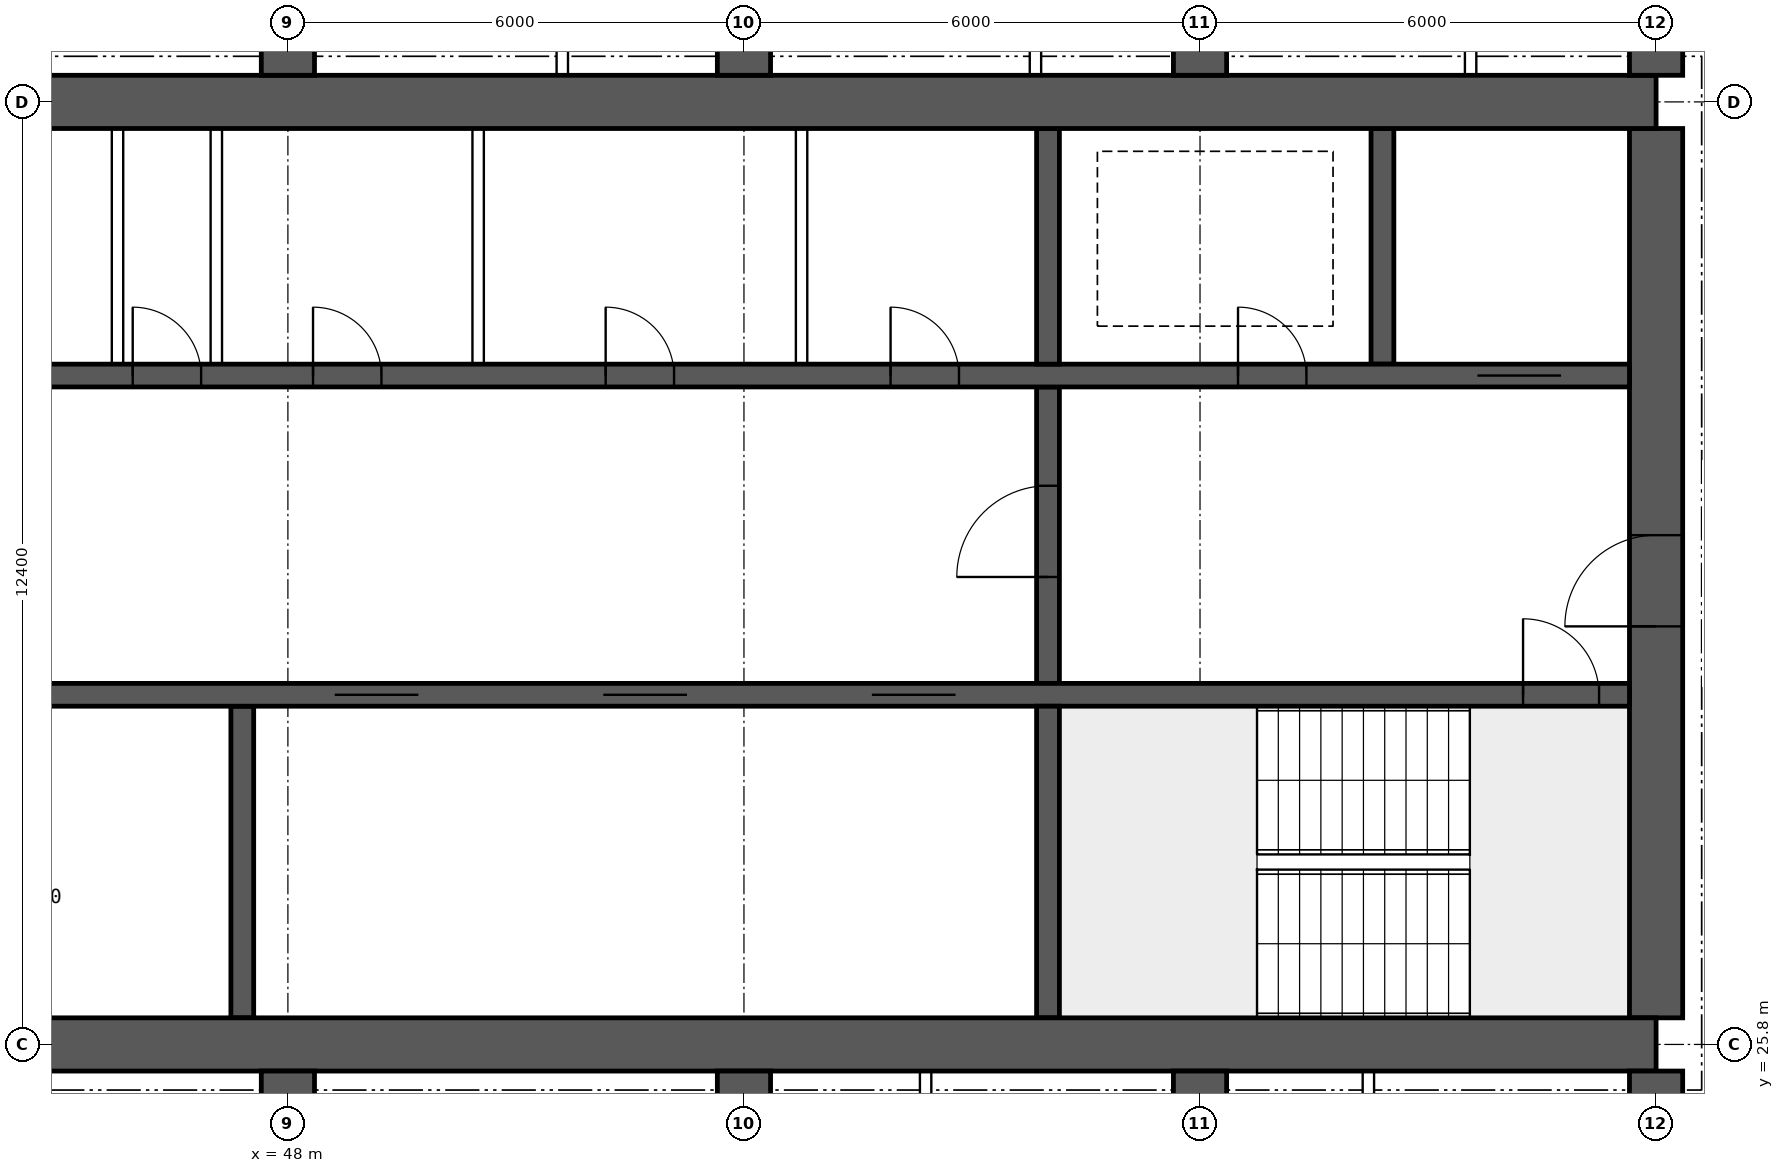
"""IFC4 building model, lengths in metres.
Left out: names, types, materials, properties, quantities, classifications, styles, units other than length and angle.
Written with IfcOpenShell. Run it as: python <this file> out.ifc"""

import sys

from ifc_helpers import new_model, si_unit, direction, frame, frame_2d, origin, place, context, subcontext, project, spatial, rectangle, extrude, element, fill, save


model = new_model("IFC4")
c1 = context("Model", 3, precision=1e-05, world=origin(), true_north=direction((0.0, 1.0)))
c2 = subcontext(c1, "Body", "Model", "MODEL_VIEW")
j1 = project(units=[si_unit("LENGTHUNIT", "METRE"), si_unit("PLANEANGLEUNIT", "RADIAN")], contexts=[c1])
p1 = place(None, origin())
s1 = spatial("IfcSite", under=j1, at=p1, CompositionType="ELEMENT")
p2 = place(p1, origin())
s2 = spatial("IfcBuilding", under=s1, at=p2, CompositionType="ELEMENT")
p3 = place(p2, frame((0.0, 0.0, 212.8)))
s3 = spatial("IfcBuildingStorey", under=s2, at=p3, CompositionType="ELEMENT", Elevation=212.8)
for number, where, z_axis, x_axis in (
    (1, (18.0, 25.8, 0.0), (0.0, 0.0, 1.0), (1.0, 0.0, 0.0)),
    (2, (18.0, 38.2, 0.0), (0.0, 0.0, 1.0), (1.0, 0.0, 0.0)),
):
    element("IfcWall", number, at=place(p3, frame(where, z_axis=z_axis, x_axis=x_axis)), inside=s3, PredefinedType="SHEAR", context=c2, shape_type="SweptSolid", body=[
        extrude(rectangle(XDim=48.0, YDim=0.7, at=frame_2d((24.0, 0.0))), origin(), (0.0, 0.0, 1.0), 3.75),
    ])
p4 = place(p3, frame((66.0, 26.15, 0.0), z_axis=(0.0, 0.0, 1.0), x_axis=(0.0, 1.0, 0.0)))
e3 = element("IfcWall", 3, at=p4, inside=s3, PredefinedType="SHEAR", context=c2, shape_type="SweptSolid", body=[
    extrude(rectangle(XDim=11.7, YDim=0.7, at=frame_2d((5.85, 0.0))), origin(), (0.0, 0.0, 1.0), 3.75),
])
p5 = place(p4, frame((5.15, 0.0, 0.0)))
e4 = element("IfcOpeningElement", 4, at=p5, cuts=e3, PredefinedType="OPENING", context=c2, shape_type="SweptSolid", body=[
    extrude(rectangle(XDim=1.2, YDim=2.1, at=frame_2d((0.6, 1.05))), frame((0.0, 0.36, 0.0), z_axis=(0.0, -1.0, 0.0), x_axis=(1.0, 0.0, 0.0)), (0.0, 0.0, 1.0), 0.72),
])
p6 = place(p3, frame((18.35, 30.4, 0.0), z_axis=(0.0, 0.0, 1.0), x_axis=(1.0, 0.0, 0.0)))
e5 = element("IfcWall", 5, at=p6, inside=s3, PredefinedType="SHEAR", context=c2, shape_type="SweptSolid", body=[
    extrude(rectangle(XDim=47.3, YDim=0.3, at=frame_2d((23.65, 0.0))), origin(), (0.0, 0.0, 1.0), 3.75),
])
p7 = place(p6, frame((0.4, 0.0, 0.0)))
e6 = element("IfcOpeningElement", 6, at=p7, cuts=e5, PredefinedType="OPENING", context=c2, shape_type="SweptSolid", body=[
    extrude(rectangle(XDim=1.0, YDim=2.1, at=frame_2d((0.5, 1.05))), frame((0.0, 0.16, 0.0), z_axis=(0.0, -1.0, 0.0), x_axis=(1.0, 0.0, 0.0)), (0.0, 0.0, 1.0), 0.32),
])
p8 = place(p6, frame((45.9, 0.0, 0.0)))
e7 = element("IfcOpeningElement", 7, at=p8, cuts=e5, PredefinedType="OPENING", context=c2, shape_type="SweptSolid", body=[
    extrude(rectangle(XDim=1.0, YDim=2.1, at=frame_2d((0.5, 1.05))), frame((0.0, 0.16, 0.0), z_axis=(0.0, -1.0, 0.0), x_axis=(1.0, 0.0, 0.0)), (0.0, 0.0, 1.0), 0.32),
])
p9 = place(p6, frame((8.4, 0.0, 0.0)))
e8 = element("IfcOpeningElement", 8, at=p9, cuts=e5, PredefinedType="OPENING", context=c2, shape_type="SweptSolid", body=[
    extrude(rectangle(XDim=1.1, YDim=2.1, at=frame_2d((0.55, 1.05))), frame((0.0, 0.16, 0.0), z_axis=(0.0, -1.0, 0.0), x_axis=(1.0, 0.0, 0.0)), (0.0, 0.0, 1.0), 0.32),
])
p10 = place(p6, frame((11.0, 0.0, 0.0)))
e9 = element("IfcOpeningElement", 9, at=p10, cuts=e5, PredefinedType="OPENING", context=c2, shape_type="SweptSolid", body=[
    extrude(rectangle(XDim=1.1, YDim=2.1, at=frame_2d((0.55, 1.05))), frame((0.0, 0.16, 0.0), z_axis=(0.0, -1.0, 0.0), x_axis=(1.0, 0.0, 0.0)), (0.0, 0.0, 1.0), 0.32),
])
p11 = place(p6, frame((13.6, 0.0, 0.0)))
e10 = element("IfcOpeningElement", 10, at=p11, cuts=e5, PredefinedType="OPENING", context=c2, shape_type="SweptSolid", body=[
    extrude(rectangle(XDim=1.1, YDim=2.1, at=frame_2d((0.55, 1.05))), frame((0.0, 0.16, 0.0), z_axis=(0.0, -1.0, 0.0), x_axis=(1.0, 0.0, 0.0)), (0.0, 0.0, 1.0), 0.32),
])
p12 = place(p6, frame((16.2, 0.0, 0.0)))
e11 = element("IfcOpeningElement", 11, at=p12, cuts=e5, PredefinedType="OPENING", context=c2, shape_type="SweptSolid", body=[
    extrude(rectangle(XDim=1.1, YDim=2.1, at=frame_2d((0.55, 1.05))), frame((0.0, 0.16, 0.0), z_axis=(0.0, -1.0, 0.0), x_axis=(1.0, 0.0, 0.0)), (0.0, 0.0, 1.0), 0.32),
])
p13 = place(p6, frame((18.975, 0.0, 0.0)))
e12 = element("IfcOpeningElement", 12, at=p13, cuts=e5, PredefinedType="OPENING", context=c2, shape_type="SweptSolid", body=[
    extrude(rectangle(XDim=0.9, YDim=2.1, at=frame_2d((0.45, 1.05))), frame((0.0, 0.16, 0.0), z_axis=(0.0, -1.0, 0.0), x_axis=(1.0, 0.0, 0.0)), (0.0, 0.0, 1.0), 0.32),
])
p14 = place(p6, frame((30.267, 0.0, 0.0)))
e13 = element("IfcOpeningElement", 13, at=p14, cuts=e5, PredefinedType="OPENING", context=c2, shape_type="SweptSolid", body=[
    extrude(rectangle(XDim=1.1, YDim=2.1, at=frame_2d((0.55, 1.05))), frame((0.0, 0.16, 0.0), z_axis=(0.0, -1.0, 0.0), x_axis=(1.0, 0.0, 0.0)), (0.0, 0.0, 1.0), 0.32),
])
p15 = place(p6, frame((33.8, 0.0, 0.0)))
e14 = element("IfcOpeningElement", 14, at=p15, cuts=e5, PredefinedType="OPENING", context=c2, shape_type="SweptSolid", body=[
    extrude(rectangle(XDim=1.1, YDim=2.1, at=frame_2d((0.55, 1.05))), frame((0.0, 0.16, 0.0), z_axis=(0.0, -1.0, 0.0), x_axis=(1.0, 0.0, 0.0)), (0.0, 0.0, 1.0), 0.32),
])
p16 = place(p6, frame((37.333, 0.0, 0.0)))
e15 = element("IfcOpeningElement", 15, at=p16, cuts=e5, PredefinedType="OPENING", context=c2, shape_type="SweptSolid", body=[
    extrude(rectangle(XDim=1.1, YDim=2.1, at=frame_2d((0.55, 1.05))), frame((0.0, 0.16, 0.0), z_axis=(0.0, -1.0, 0.0), x_axis=(1.0, 0.0, 0.0)), (0.0, 0.0, 1.0), 0.32),
])
p17 = place(p3, frame((18.35, 34.6, 0.0), z_axis=(0.0, 0.0, 1.0), x_axis=(1.0, 0.0, 0.0)))
e16 = element("IfcWall", 16, at=p17, inside=s3, PredefinedType="SHEAR", context=c2, shape_type="SweptSolid", body=[
    extrude(rectangle(XDim=47.3, YDim=0.3, at=frame_2d((23.65, 0.0))), origin(), (0.0, 0.0, 1.0), 3.75),
])
p18 = place(p17, frame((0.9, 0.0, 0.0)))
e17 = element("IfcOpeningElement", 17, at=p18, cuts=e16, PredefinedType="OPENING", context=c2, shape_type="SweptSolid", body=[
    extrude(rectangle(XDim=1.1, YDim=2.1, at=frame_2d((0.55, 1.05))), frame((0.0, 0.16, 0.0), z_axis=(0.0, -1.0, 0.0), x_axis=(1.0, 0.0, 0.0)), (0.0, 0.0, 1.0), 0.32),
])
p19 = place(p17, frame((45.3, 0.0, 0.0)))
e18 = element("IfcOpeningElement", 18, at=p19, cuts=e16, PredefinedType="OPENING", context=c2, shape_type="SweptSolid", body=[
    extrude(rectangle(XDim=1.1, YDim=2.1, at=frame_2d((0.55, 1.05))), frame((0.0, 0.16, 0.0), z_axis=(0.0, -1.0, 0.0), x_axis=(1.0, 0.0, 0.0)), (0.0, 0.0, 1.0), 0.32),
])
p20 = place(p17, frame((4.25, 0.0, 0.0)))
e19 = element("IfcOpeningElement", 19, at=p20, cuts=e16, PredefinedType="OPENING", context=c2, shape_type="SweptSolid", body=[
    extrude(rectangle(XDim=0.9, YDim=2.1, at=frame_2d((0.45, 1.05))), frame((0.0, 0.16, 0.0), z_axis=(0.0, -1.0, 0.0), x_axis=(1.0, 0.0, 0.0)), (0.0, 0.0, 1.0), 0.32),
])
p21 = place(p17, frame((42.15, 0.0, 0.0)))
e20 = element("IfcOpeningElement", 20, at=p21, cuts=e16, PredefinedType="OPENING", context=c2, shape_type="SweptSolid", body=[
    extrude(rectangle(XDim=0.9, YDim=2.1, at=frame_2d((0.45, 1.05))), frame((0.0, 0.16, 0.0), z_axis=(0.0, -1.0, 0.0), x_axis=(1.0, 0.0, 0.0)), (0.0, 0.0, 1.0), 0.32),
])
p22 = place(p17, frame((9.025, 0.0, 0.0)))
e21 = element("IfcOpeningElement", 21, at=p22, cuts=e16, PredefinedType="OPENING", context=c2, shape_type="SweptSolid", body=[
    extrude(rectangle(XDim=0.9, YDim=2.1, at=frame_2d((0.45, 1.05))), frame((0.0, 0.16, 0.0), z_axis=(0.0, -1.0, 0.0), x_axis=(1.0, 0.0, 0.0)), (0.0, 0.0, 1.0), 0.32),
])
p23 = place(p17, frame((12.999, 0.0, 0.0)))
e22 = element("IfcOpeningElement", 22, at=p23, cuts=e16, PredefinedType="OPENING", context=c2, shape_type="SweptSolid", body=[
    extrude(rectangle(XDim=0.9, YDim=2.1, at=frame_2d((0.45, 1.05))), frame((0.0, 0.16, 0.0), z_axis=(0.0, -1.0, 0.0), x_axis=(1.0, 0.0, 0.0)), (0.0, 0.0, 1.0), 0.32),
])
p24 = place(p17, frame((16.646, 0.0, 0.0)))
e23 = element("IfcOpeningElement", 23, at=p24, cuts=e16, PredefinedType="OPENING", context=c2, shape_type="SweptSolid", body=[
    extrude(rectangle(XDim=0.9, YDim=2.1, at=frame_2d((0.45, 1.05))), frame((0.0, 0.16, 0.0), z_axis=(0.0, -1.0, 0.0), x_axis=(1.0, 0.0, 0.0)), (0.0, 0.0, 1.0), 0.32),
])
p25 = place(p17, frame((20.405, 0.0, 0.0)))
e24 = element("IfcOpeningElement", 24, at=p25, cuts=e16, PredefinedType="OPENING", context=c2, shape_type="SweptSolid", body=[
    extrude(rectangle(XDim=0.9, YDim=2.1, at=frame_2d((0.45, 1.05))), frame((0.0, 0.16, 0.0), z_axis=(0.0, -1.0, 0.0), x_axis=(1.0, 0.0, 0.0)), (0.0, 0.0, 1.0), 0.32),
])
p26 = place(p17, frame((24.811, 0.0, 0.0)))
e25 = element("IfcOpeningElement", 25, at=p26, cuts=e16, PredefinedType="OPENING", context=c2, shape_type="SweptSolid", body=[
    extrude(rectangle(XDim=0.9, YDim=2.1, at=frame_2d((0.45, 1.05))), frame((0.0, 0.16, 0.0), z_axis=(0.0, -1.0, 0.0), x_axis=(1.0, 0.0, 0.0)), (0.0, 0.0, 1.0), 0.32),
])
p27 = place(p17, frame((27.608, 0.0, 0.0)))
e26 = element("IfcOpeningElement", 26, at=p27, cuts=e16, PredefinedType="OPENING", context=c2, shape_type="SweptSolid", body=[
    extrude(rectangle(XDim=0.9, YDim=2.1, at=frame_2d((0.45, 1.05))), frame((0.0, 0.16, 0.0), z_axis=(0.0, -1.0, 0.0), x_axis=(1.0, 0.0, 0.0)), (0.0, 0.0, 1.0), 0.32),
])
p28 = place(p17, frame((29.981, 0.0, 0.0)))
e27 = element("IfcOpeningElement", 27, at=p28, cuts=e16, PredefinedType="OPENING", context=c2, shape_type="SweptSolid", body=[
    extrude(rectangle(XDim=0.9, YDim=2.1, at=frame_2d((0.45, 1.05))), frame((0.0, 0.16, 0.0), z_axis=(0.0, -1.0, 0.0), x_axis=(1.0, 0.0, 0.0)), (0.0, 0.0, 1.0), 0.32),
])
p29 = place(p17, frame((33.831, 0.0, 0.0)))
e28 = element("IfcOpeningElement", 28, at=p29, cuts=e16, PredefinedType="OPENING", context=c2, shape_type="SweptSolid", body=[
    extrude(rectangle(XDim=0.9, YDim=2.1, at=frame_2d((0.45, 1.05))), frame((0.0, 0.16, 0.0), z_axis=(0.0, -1.0, 0.0), x_axis=(1.0, 0.0, 0.0)), (0.0, 0.0, 1.0), 0.32),
])
p30 = place(p17, frame((37.579, 0.0, 0.0)))
e29 = element("IfcOpeningElement", 29, at=p30, cuts=e16, PredefinedType="OPENING", context=c2, shape_type="SweptSolid", body=[
    extrude(rectangle(XDim=0.9, YDim=2.1, at=frame_2d((0.45, 1.05))), frame((0.0, 0.16, 0.0), z_axis=(0.0, -1.0, 0.0), x_axis=(1.0, 0.0, 0.0)), (0.0, 0.0, 1.0), 0.32),
])
p31 = place(p3, frame((58.0, 26.15, 0.0), z_axis=(0.0, 0.0, 1.0), x_axis=(0.0, 1.0, 0.0)))
e30 = element("IfcWall", 30, at=p31, inside=s3, PredefinedType="SHEAR", context=c2, shape_type="SweptSolid", body=[
    extrude(rectangle(XDim=4.1, YDim=0.3, at=frame_2d((2.05, 0.0))), origin(), (0.0, 0.0, 1.0), 3.75),
])
p32 = place(p3, frame((58.0, 30.55, 0.0), z_axis=(0.0, 0.0, 1.0), x_axis=(0.0, 1.0, 0.0)))
e31 = element("IfcWall", 31, at=p32, inside=s3, PredefinedType="SHEAR", context=c2, shape_type="SweptSolid", body=[
    extrude(rectangle(XDim=3.9, YDim=0.3, at=frame_2d((1.95, 0.0))), origin(), (0.0, 0.0, 1.0), 3.75),
])
p33 = place(p32, frame((1.4, 0.0, 0.0)))
e32 = element("IfcOpeningElement", 32, at=p33, cuts=e31, PredefinedType="OPENING", context=c2, shape_type="SweptSolid", body=[
    extrude(rectangle(XDim=1.2, YDim=2.1, at=frame_2d((0.6, 1.05))), frame((0.0, 0.16, 0.0), z_axis=(0.0, -1.0, 0.0), x_axis=(1.0, 0.0, 0.0)), (0.0, 0.0, 1.0), 0.32),
])
for number, where, z_axis, x_axis in (
    (33, (62.4, 34.75, 0.0), (0.0, 0.0, 1.0), (0.0, 1.0, 0.0)),
    (34, (58.0, 34.75, 0.0), (0.0, 0.0, 1.0), (0.0, 1.0, 0.0)),
):
    element("IfcWall", number, at=place(p3, frame(where, z_axis=z_axis, x_axis=x_axis)), inside=s3, PredefinedType="SHEAR", context=c2, shape_type="SweptSolid", body=[
        extrude(rectangle(XDim=3.1, YDim=0.3, at=frame_2d((1.55, 0.0))), origin(), (0.0, 0.0, 1.0), 3.75),
    ])
p34 = place(p3, frame((47.4, 26.15, 0.0), z_axis=(0.0, 0.0, 1.0), x_axis=(0.0, 1.0, 0.0)))
e35 = element("IfcWall", 35, at=p34, inside=s3, PredefinedType="SHEAR", context=c2, shape_type="SweptSolid", body=[
    extrude(rectangle(XDim=4.1, YDim=0.3, at=frame_2d((2.05, 0.0))), origin(), (0.0, 0.0, 1.0), 3.75),
])
for number, where, z_axis, x_axis in (
    (36, (48.0, 18.4, 0.0), (0.0, 0.0, 1.0), (0.0, 1.0, 0.0)),
    (37, (48.0, 38.55, 0.0), (0.0, 0.0, 1.0), (0.0, 1.0, 0.0)),
    (38, (54.0, 18.4, 0.0), (0.0, 0.0, 1.0), (0.0, 1.0, 0.0)),
    (39, (54.0, 38.55, 0.0), (0.0, 0.0, 1.0), (0.0, 1.0, 0.0)),
    (40, (60.0, 18.4, 0.0), (0.0, 0.0, 1.0), (0.0, 1.0, 0.0)),
    (41, (60.0, 38.55, 0.0), (0.0, 0.0, 1.0), (0.0, 1.0, 0.0)),
    (42, (66.0, 18.4, 0.0), (0.0, 0.0, 1.0), (0.0, 1.0, 0.0)),
    (43, (66.0, 38.55, 0.0), (0.0, 0.0, 1.0), (0.0, 1.0, 0.0)),
):
    element("IfcWall", number, at=place(p3, frame(where, z_axis=z_axis, x_axis=x_axis)), inside=s3, PredefinedType="SHEAR", context=c2, shape_type="SweptSolid", body=[
        extrude(rectangle(XDim=7.05, YDim=0.7, at=frame_2d((3.525, 0.0))), origin(), (0.0, 0.0, 1.0), 3.75),
    ])
for number, where, z_axis, x_axis in (
    (44, (45.758, 34.75, 0.0), (0.0, 0.0, 1.0), (0.0, 1.0, 0.0)),
    (45, (47.058, 34.75, 0.0), (0.0, 0.0, 1.0), (0.0, 1.0, 0.0)),
    (46, (50.503, 34.75, 0.0), (0.0, 0.0, 1.0), (0.0, 1.0, 0.0)),
    (47, (54.758, 34.75, 0.0), (0.0, 0.0, 1.0), (0.0, 1.0, 0.0)),
):
    element("IfcWall", number, at=place(p3, frame(where, z_axis=z_axis, x_axis=x_axis)), inside=s3, PredefinedType="SOLIDWALL", context=c2, shape_type="SweptSolid", body=[
        extrude(rectangle(XDim=3.1, YDim=0.15, at=frame_2d((1.55, 0.0))), origin(), (0.0, 0.0, 1.0), 3.3),
    ])
for number, where, z_axis, x_axis in (
    (48, (56.39, 18.5, 0.0), (0.0, 0.0, 1.0), (0.0, 1.0, 0.0)),
    (49, (62.215, 18.5, 0.0), (0.0, 0.0, 1.0), (0.0, 1.0, 0.0)),
    (50, (51.61, 38.55, 0.0), (0.0, 0.0, 1.0), (0.0, 1.0, 0.0)),
    (51, (57.835, 38.55, 0.0), (0.0, 0.0, 1.0), (0.0, 1.0, 0.0)),
    (52, (63.56, 38.55, 0.0), (0.0, 0.0, 1.0), (0.0, 1.0, 0.0)),
):
    element("IfcWall", number, at=place(p3, frame(where, z_axis=z_axis, x_axis=x_axis)), inside=s3, PredefinedType="PARTITIONING", context=c2, shape_type="SweptSolid", body=[
        extrude(rectangle(XDim=6.95, YDim=0.15, at=frame_2d((3.475, 0.0))), origin(), (0.0, 0.0, 1.0), 3.3),
    ])
p35 = place(p5, origin())
e53 = element("IfcDoor", 53, at=p35, inside=s3, OperationType="SINGLE_SWING_LEFT", PredefinedType="DOOR", context=c2, shape_type="SweptSolid", body=[
    extrude(rectangle(XDim=1.2, YDim=2.1, at=frame_2d((0.6, 1.05))), frame((0.0, 0.025, 0.0), z_axis=(0.0, -1.0, 0.0), x_axis=(1.0, 0.0, 0.0)), (0.0, 0.0, 1.0), 0.05),
])
fill(e4, e53)
p36 = place(p8, origin())
e54 = element("IfcDoor", 54, at=p36, inside=s3, OperationType="SINGLE_SWING_LEFT", PredefinedType="DOOR", context=c2, shape_type="SweptSolid", body=[
    extrude(rectangle(XDim=1.0, YDim=2.1, at=frame_2d((0.5, 1.05))), frame((0.0, 0.025, 0.0), z_axis=(0.0, -1.0, 0.0), x_axis=(1.0, 0.0, 0.0)), (0.0, 0.0, 1.0), 0.05),
])
fill(e7, e54)
p37 = place(p19, origin())
e55 = element("IfcDoor", 55, at=p37, inside=s3, OperationType="DOUBLE_DOOR_SLIDING", PredefinedType="DOOR", context=c2, shape_type="SweptSolid", body=[
    extrude(rectangle(XDim=1.1, YDim=2.1, at=frame_2d((0.55, 1.05))), frame((0.0, 0.025, 0.0), z_axis=(0.0, -1.0, 0.0), x_axis=(1.0, 0.0, 0.0)), (0.0, 0.0, 1.0), 0.05),
])
fill(e18, e55)
p38 = place(p21, origin())
e56 = element("IfcDoor", 56, at=p38, inside=s3, OperationType="SINGLE_SWING_LEFT", PredefinedType="DOOR", context=c2, shape_type="SweptSolid", body=[
    extrude(rectangle(XDim=0.9, YDim=2.1, at=frame_2d((0.45, 1.05))), frame((0.0, 0.025, 0.0), z_axis=(0.0, -1.0, 0.0), x_axis=(1.0, 0.0, 0.0)), (0.0, 0.0, 1.0), 0.05),
])
fill(e20, e56)
p39 = place(p33, origin())
e57 = element("IfcDoor", 57, at=p39, inside=s3, OperationType="SINGLE_SWING_LEFT", PredefinedType="DOOR", context=c2, shape_type="SweptSolid", body=[
    extrude(rectangle(XDim=1.2, YDim=2.1, at=frame_2d((0.6, 1.05))), frame((0.0, 0.025, 0.0), z_axis=(0.0, -1.0, 0.0), x_axis=(1.0, 0.0, 0.0)), (0.0, 0.0, 1.0), 0.05),
])
fill(e32, e57)
p40 = place(p27, origin())
e58 = element("IfcDoor", 58, at=p40, inside=s3, OperationType="SINGLE_SWING_LEFT", PredefinedType="DOOR", context=c2, shape_type="SweptSolid", body=[
    extrude(rectangle(XDim=0.9, YDim=2.1, at=frame_2d((0.45, 1.05))), frame((0.0, 0.025, 0.0), z_axis=(0.0, -1.0, 0.0), x_axis=(1.0, 0.0, 0.0)), (0.0, 0.0, 1.0), 0.05),
])
fill(e26, e58)
p41 = place(p28, origin())
e59 = element("IfcDoor", 59, at=p41, inside=s3, OperationType="SINGLE_SWING_LEFT", PredefinedType="DOOR", context=c2, shape_type="SweptSolid", body=[
    extrude(rectangle(XDim=0.9, YDim=2.1, at=frame_2d((0.45, 1.05))), frame((0.0, 0.025, 0.0), z_axis=(0.0, -1.0, 0.0), x_axis=(1.0, 0.0, 0.0)), (0.0, 0.0, 1.0), 0.05),
])
fill(e27, e59)
p42 = place(p29, origin())
e60 = element("IfcDoor", 60, at=p42, inside=s3, OperationType="SINGLE_SWING_LEFT", PredefinedType="DOOR", context=c2, shape_type="SweptSolid", body=[
    extrude(rectangle(XDim=0.9, YDim=2.1, at=frame_2d((0.45, 1.05))), frame((0.0, 0.025, 0.0), z_axis=(0.0, -1.0, 0.0), x_axis=(1.0, 0.0, 0.0)), (0.0, 0.0, 1.0), 0.05),
])
fill(e28, e60)
p43 = place(p30, origin())
e61 = element("IfcDoor", 61, at=p43, inside=s3, OperationType="SINGLE_SWING_LEFT", PredefinedType="DOOR", context=c2, shape_type="SweptSolid", body=[
    extrude(rectangle(XDim=0.9, YDim=2.1, at=frame_2d((0.45, 1.05))), frame((0.0, 0.025, 0.0), z_axis=(0.0, -1.0, 0.0), x_axis=(1.0, 0.0, 0.0)), (0.0, 0.0, 1.0), 0.05),
])
fill(e29, e61)
p44 = place(p14, origin())
e62 = element("IfcDoor", 62, at=p44, inside=s3, OperationType="DOUBLE_DOOR_SLIDING", PredefinedType="DOOR", context=c2, shape_type="SweptSolid", body=[
    extrude(rectangle(XDim=1.1, YDim=2.1, at=frame_2d((0.55, 1.05))), frame((0.0, 0.025, 0.0), z_axis=(0.0, -1.0, 0.0), x_axis=(1.0, 0.0, 0.0)), (0.0, 0.0, 1.0), 0.05),
])
fill(e13, e62)
p45 = place(p15, origin())
e63 = element("IfcDoor", 63, at=p45, inside=s3, OperationType="DOUBLE_DOOR_SLIDING", PredefinedType="DOOR", context=c2, shape_type="SweptSolid", body=[
    extrude(rectangle(XDim=1.1, YDim=2.1, at=frame_2d((0.55, 1.05))), frame((0.0, 0.025, 0.0), z_axis=(0.0, -1.0, 0.0), x_axis=(1.0, 0.0, 0.0)), (0.0, 0.0, 1.0), 0.05),
])
fill(e14, e63)
p46 = place(p16, origin())
e64 = element("IfcDoor", 64, at=p46, inside=s3, OperationType="DOUBLE_DOOR_SLIDING", PredefinedType="DOOR", context=c2, shape_type="SweptSolid", body=[
    extrude(rectangle(XDim=1.1, YDim=2.1, at=frame_2d((0.55, 1.05))), frame((0.0, 0.025, 0.0), z_axis=(0.0, -1.0, 0.0), x_axis=(1.0, 0.0, 0.0)), (0.0, 0.0, 1.0), 0.05),
])
fill(e15, e64)
save(model, sys.argv[1])
